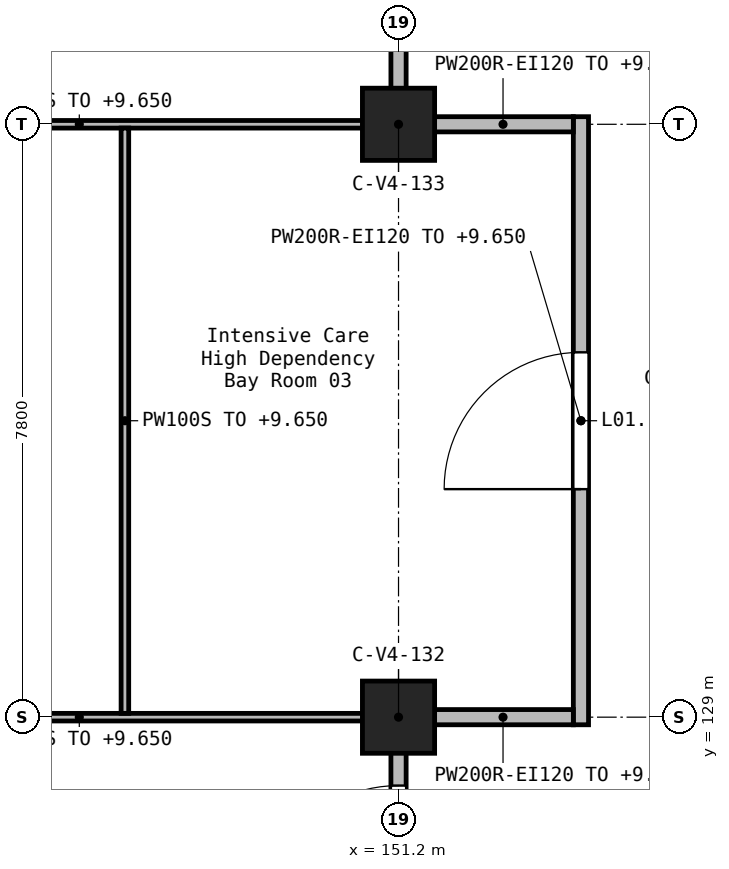
"""IFC4 building model, lengths in metres.
Left out: names, types, materials, properties, quantities, classifications, styles, units other than length and angle.
Written with IfcOpenShell. Run it as: python <this file> out.ifc"""

import sys

from ifc_helpers import new_model, si_unit, direction, frame, frame_2d, origin, origin_2d, place, context, subcontext, project, spatial, rectangle, extrude, element, fill, save


model = new_model("IFC4")
c1 = context("Model", 3, precision=1e-05, world=origin(), true_north=direction((0.0, 1.0)))
c2 = subcontext(c1, "Body", "Model", "MODEL_VIEW")
j1 = project(units=[si_unit("LENGTHUNIT", "METRE"), si_unit("PLANEANGLEUNIT", "RADIAN")], contexts=[c1])
p1 = place(None, origin())
s1 = spatial("IfcSite", under=j1, at=p1, CompositionType="ELEMENT")
p2 = place(p1, origin())
s2 = spatial("IfcBuilding", under=s1, at=p2, CompositionType="ELEMENT")
p3 = place(p2, frame((0.0, 0.0, 5.4)))
s3 = spatial("IfcBuildingStorey", under=s2, at=p3, CompositionType="ELEMENT", Elevation=5.4)
for number, where, z_axis, x_axis in (
    (1, (151.2, 129.0, 0.0), (0.0, 0.0, 1.0), (1.0, 0.0, 0.0)),
    (2, (151.2, 136.8, 0.0), (0.0, 0.0, 1.0), (1.0, 0.0, 0.0)),
):
    element("IfcColumn", number, at=place(p3, frame(where, z_axis=z_axis, x_axis=x_axis)), inside=s3, PredefinedType="COLUMN", context=c2, shape_type="SweptSolid", body=[
        extrude(rectangle(XDim=0.95, YDim=0.95, at=origin_2d()), origin(), (0.0, 0.0, 1.0), 4.5),
    ])
p4 = place(p3, frame((151.2, 125.85, 0.0), z_axis=(0.0, 0.0, 1.0), x_axis=(0.0, 1.0, 0.0)))
e3 = element("IfcWall", 3, at=p4, inside=s3, PredefinedType="SOLIDWALL", context=c2, shape_type="SweptSolid", body=[
    extrude(rectangle(XDim=2.7, YDim=0.2, at=frame_2d((1.35, 0.0))), origin(), (0.0, 0.0, 1.0), 4.25),
])
p5 = place(p4, frame((0.45, 0.0, 0.0)))
e4 = element("IfcOpeningElement", 4, at=p5, cuts=e3, PredefinedType="OPENING", context=c2, shape_type="SweptSolid", body=[
    extrude(rectangle(XDim=1.8, YDim=2.1, at=frame_2d((0.9, 1.05))), frame((0.0, 0.11, 0.0), z_axis=(0.0, -1.0, 0.0), x_axis=(1.0, 0.0, 0.0)), (0.0, 0.0, 1.0), 0.22),
])
p6 = place(p3, frame((153.6, 128.9, 0.0), z_axis=(0.0, 0.0, 1.0), x_axis=(0.0, 1.0, 0.0)))
e5 = element("IfcWall", 5, at=p6, inside=s3, PredefinedType="SOLIDWALL", context=c2, shape_type="SweptSolid", body=[
    extrude(rectangle(XDim=8.0, YDim=0.2, at=frame_2d((4.0, 0.0))), origin(), (0.0, 0.0, 1.0), 4.25),
])
p7 = place(p6, frame((3.1, 0.0, 0.0)))
e6 = element("IfcOpeningElement", 6, at=p7, cuts=e5, PredefinedType="OPENING", context=c2, shape_type="SweptSolid", body=[
    extrude(rectangle(XDim=1.8, YDim=2.1, at=frame_2d((0.9, 1.05))), frame((0.0, 0.11, 0.0), z_axis=(0.0, -1.0, 0.0), x_axis=(1.0, 0.0, 0.0)), (0.0, 0.0, 1.0), 0.22),
])
p8 = place(p3, frame((151.2, 137.25, 0.0), z_axis=(0.0, 0.0, 1.0), x_axis=(0.0, 1.0, 0.0)))
e7 = element("IfcWall", 7, at=p8, inside=s3, PredefinedType="SOLIDWALL", context=c2, shape_type="SweptSolid", body=[
    extrude(rectangle(XDim=2.65, YDim=0.2, at=frame_2d((1.325, 0.0))), origin(), (0.0, 0.0, 1.0), 4.25),
])
for number, where, z_axis, x_axis in (
    (8, (151.65, 129.0, 0.0), (0.0, 0.0, 1.0), (1.0, 0.0, 0.0)),
    (9, (151.65, 136.8, 0.0), (0.0, 0.0, 1.0), (1.0, 0.0, 0.0)),
):
    element("IfcWall", number, at=place(p3, frame(where, z_axis=z_axis, x_axis=x_axis)), inside=s3, PredefinedType="SOLIDWALL", context=c2, shape_type="SweptSolid", body=[
        extrude(rectangle(XDim=1.85, YDim=0.2, at=frame_2d((0.925, 0.0))), origin(), (0.0, 0.0, 1.0), 4.25),
    ])
p9 = place(p3, frame((150.75, 136.8, 0.0), z_axis=(0.0, 0.0, 1.0), x_axis=(-1.0, 0.0, 0.0)))
e10 = element("IfcWall", 10, at=p9, inside=s3, PredefinedType="PARTITIONING", context=c2, shape_type="SweptSolid", body=[
    extrude(rectangle(XDim=7.5, YDim=0.1, at=frame_2d((3.75, 0.0))), origin(), (0.0, 0.0, 1.0), 4.25),
])
p10 = place(p9, frame((4.85, 0.0, 0.0)))
e11 = element("IfcOpeningElement", 11, at=p10, cuts=e10, PredefinedType="OPENING", context=c2, shape_type="SweptSolid", body=[
    extrude(rectangle(XDim=1.4, YDim=2.1, at=frame_2d((0.7, 1.05))), frame((0.0, 0.06, 0.0), z_axis=(0.0, -1.0, 0.0), x_axis=(1.0, 0.0, 0.0)), (0.0, 0.0, 1.0), 0.12),
])
p11 = place(p3, frame((143.25, 129.0, 0.0), z_axis=(0.0, 0.0, 1.0), x_axis=(1.0, 0.0, 0.0)))
e12 = element("IfcWall", 12, at=p11, inside=s3, PredefinedType="PARTITIONING", context=c2, shape_type="SweptSolid", body=[
    extrude(rectangle(XDim=7.5, YDim=0.1, at=frame_2d((3.75, 0.0))), origin(), (0.0, 0.0, 1.0), 4.25),
])
p12 = place(p3, frame((147.6, 129.05, 0.0), z_axis=(0.0, 0.0, 1.0), x_axis=(0.0, 1.0, 0.0)))
e13 = element("IfcWall", 13, at=p12, inside=s3, PredefinedType="PARTITIONING", context=c2, shape_type="SweptSolid", body=[
    extrude(rectangle(XDim=7.7, YDim=0.1, at=frame_2d((3.85, 0.0))), origin(), (0.0, 0.0, 1.0), 4.25),
])
p13 = place(p5, origin())
e14 = element("IfcDoor", 14, at=p13, inside=s3, OperationType="DOUBLE_DOOR_SINGLE_SWING", PredefinedType="DOOR", context=c2, shape_type="SweptSolid", body=[
    extrude(rectangle(XDim=1.8, YDim=2.1, at=frame_2d((0.9, 1.05))), frame((0.0, 0.025, 0.0), z_axis=(0.0, -1.0, 0.0), x_axis=(1.0, 0.0, 0.0)), (0.0, 0.0, 1.0), 0.05),
])
fill(e4, e14)
p14 = place(p7, origin())
e15 = element("IfcDoor", 15, at=p14, inside=s3, OperationType="DOUBLE_DOOR_SINGLE_SWING", PredefinedType="DOOR", context=c2, shape_type="SweptSolid", body=[
    extrude(rectangle(XDim=1.8, YDim=2.1, at=frame_2d((0.9, 1.05))), frame((0.0, 0.025, 0.0), z_axis=(0.0, -1.0, 0.0), x_axis=(1.0, 0.0, 0.0)), (0.0, 0.0, 1.0), 0.05),
])
fill(e6, e15)
save(model, sys.argv[1])
